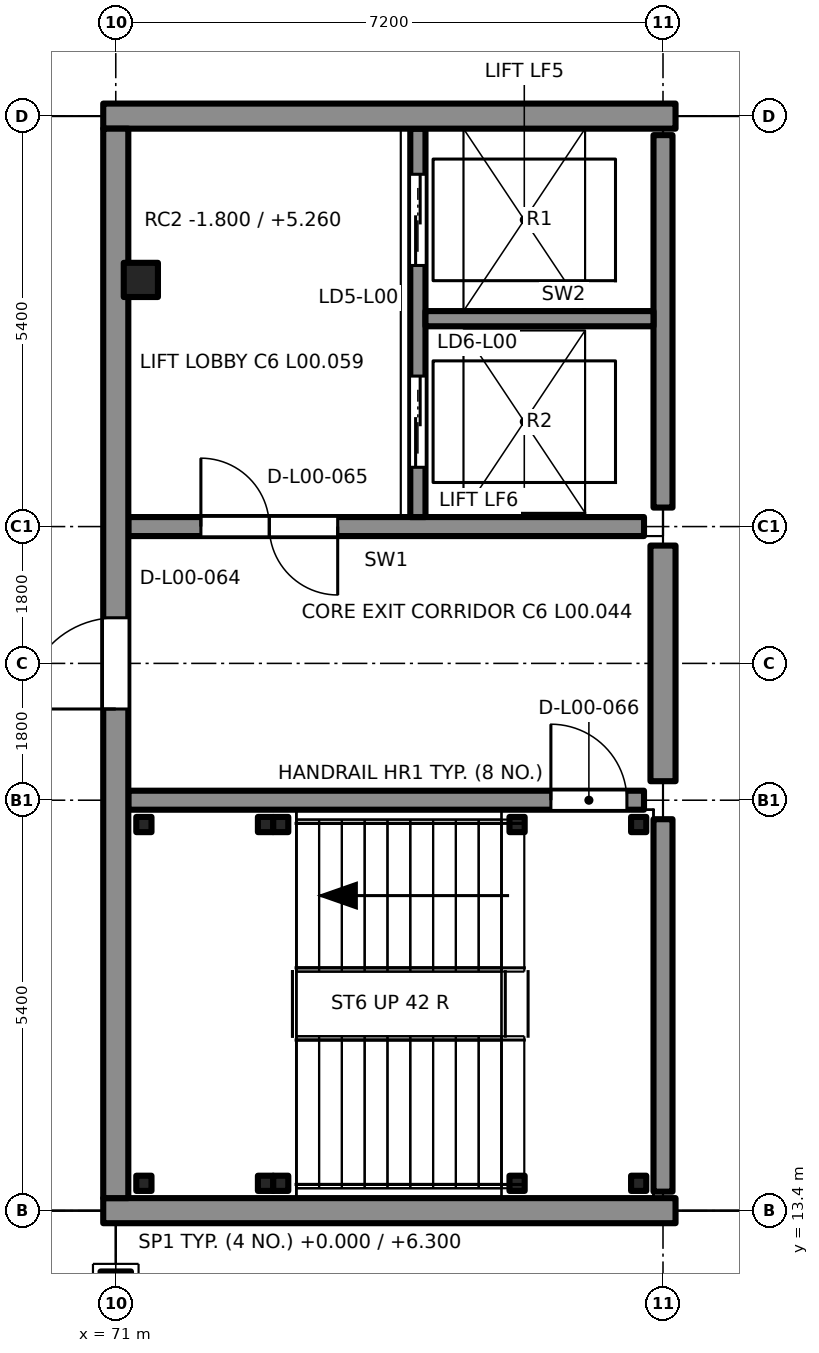
"""IFC4 building model, lengths in metres.
Left out: names, types, materials, properties, quantities, classifications, styles, units other than length and angle.
Written with IfcOpenShell. Run it as: python <this file> out.ifc"""

import sys

from ifc_helpers import new_model, si_unit, direction, frame, frame_2d, origin, origin_2d, place, context, subcontext, project, spatial, rectangle, extrude, element, fill, save


model = new_model("IFC4")
c1 = context("Model", 3, precision=1e-05, world=origin(), true_north=direction((0.0, 1.0)))
c2 = subcontext(c1, "Body", "Model", "MODEL_VIEW")
j1 = project(units=[si_unit("LENGTHUNIT", "METRE"), si_unit("PLANEANGLEUNIT", "RADIAN")], contexts=[c1])
p1 = place(None, origin())
s1 = spatial("IfcSite", under=j1, at=p1, CompositionType="ELEMENT")
p2 = place(p1, origin())
s2 = spatial("IfcBuilding", under=s1, at=p2, CompositionType="ELEMENT")
p3 = place(p2, origin())
s3 = spatial("IfcBuildingStorey", under=s2, at=p3, CompositionType="ELEMENT", Elevation=0.0)
for number, where, z_axis, x_axis in (
    (1, (84.4, 13.4, -0.2), (0.0, 0.0, 1.0), (1.0, 0.0, 0.0)),
    (2, (84.4, 27.8, -0.2), (0.0, 0.0, 1.0), (1.0, 0.0, 0.0)),
):
    element("IfcColumn", number, at=place(p3, frame(where, z_axis=z_axis, x_axis=x_axis)), inside=s3, PredefinedType="COLUMN", context=c2, shape_type="SweptSolid", body=[
        extrude(rectangle(XDim=1.6, YDim=1.2, at=origin_2d()), origin(), (-0.736, 0.0, 0.677), 6.794),
    ])
p4 = place(p3, frame((71.0, 12.4, -0.2), z_axis=(0.0, 0.0, 1.0), x_axis=(1.0, 0.0, 0.0)))
e3 = element("IfcColumn", 3, at=p4, inside=s3, PredefinedType="COLUMN", context=c2, shape_type="SweptSolid", body=[
    extrude(rectangle(XDim=0.4, YDim=0.4, at=origin_2d()), origin(), (0.0, 0.0, 1.0), 4.133),
])
p5 = place(p3, frame((71.33, 25.645, -1.8), z_axis=(0.0, 0.0, 1.0), x_axis=(1.0, 0.0, 0.0)))
e4 = element("IfcColumn", 4, at=p5, inside=s3, PredefinedType="COLUMN", context=c2, shape_type="SweptSolid", body=[
    extrude(rectangle(XDim=0.45, YDim=0.45, at=origin_2d()), origin(), (0.0, 0.0, 1.0), 7.06),
])
p6 = place(p3, frame((71.165, 18.8, 0.0), z_axis=(0.0, 0.0, 1.0), x_axis=(1.0, 0.0, 0.0)))
e5 = element("IfcWall", 5, at=p6, inside=s3, PredefinedType="SHEAR", context=c2, shape_type="SweptSolid", body=[
    extrude(rectangle(XDim=6.785, YDim=0.25, at=frame_2d((3.393, 0.0))), origin(), (0.0, 0.0, 1.0), 5.9),
])
p7 = place(p6, frame((5.56, 0.0, 0.0)))
e6 = element("IfcOpeningElement", 6, at=p7, cuts=e5, PredefinedType="OPENING", context=c2, shape_type="SweptSolid", body=[
    extrude(rectangle(XDim=1.0, YDim=2.1, at=frame_2d((0.5, 1.05))), frame((0.0, 0.135, 0.0), z_axis=(0.0, -1.0, 0.0), x_axis=(1.0, 0.0, 0.0)), (0.0, 0.0, 1.0), 0.27),
])
p8 = place(p3, frame((78.2, 13.65, 0.0), z_axis=(0.0, 0.0, 1.0), x_axis=(0.0, 1.0, 0.0)))
e7 = element("IfcWall", 7, at=p8, inside=s3, PredefinedType="SHEAR", context=c2, shape_type="SweptSolid", body=[
    extrude(rectangle(XDim=4.9, YDim=0.25, at=frame_2d((2.45, 0.0))), origin(), (0.0, 0.0, 1.0), 4.4),
])
p9 = place(p3, frame((71.165, 22.4, -1.4), z_axis=(0.0, 0.0, 1.0), x_axis=(1.0, 0.0, 0.0)))
e8 = element("IfcWall", 8, at=p9, inside=s3, PredefinedType="SHEAR", context=c2, shape_type="SweptSolid", body=[
    extrude(rectangle(XDim=6.785, YDim=0.25, at=frame_2d((3.393, 0.0))), origin(), (0.0, 0.0, 1.0), 7.3),
])
p10 = place(p9, frame((0.955, 0.0, 1.4)))
e9 = element("IfcOpeningElement", 9, at=p10, cuts=e8, PredefinedType="OPENING", context=c2, shape_type="SweptSolid", body=[
    extrude(rectangle(XDim=1.8, YDim=2.1, at=frame_2d((0.9, 1.05))), frame((0.0, 0.135, 0.0), z_axis=(0.0, -1.0, 0.0), x_axis=(1.0, 0.0, 0.0)), (0.0, 0.0, 1.0), 0.27),
])
p11 = place(p3, frame((78.2, 22.65, -1.4), z_axis=(0.0, 0.0, 1.0), x_axis=(0.0, 1.0, 0.0)))
e10 = element("IfcWall", 10, at=p11, inside=s3, PredefinedType="SHEAR", context=c2, shape_type="SweptSolid", body=[
    extrude(rectangle(XDim=4.9, YDim=0.25, at=frame_2d((2.45, 0.0))), origin(), (0.0, 0.0, 1.0), 5.8),
])
p12 = place(p3, frame((74.975, 22.525, -1.4), z_axis=(0.0, 0.0, 1.0), x_axis=(0.0, 1.0, 0.0)))
e11 = element("IfcWall", 11, at=p12, inside=s3, PredefinedType="SHEAR", context=c2, shape_type="SweptSolid", body=[
    extrude(rectangle(XDim=5.11, YDim=0.2, at=frame_2d((2.555, 0.0))), origin(), (0.0, 0.0, 1.0), 7.3),
])
p13 = place(p12, frame((3.31, 0.0, 1.4)))
e12 = element("IfcOpeningElement", 12, at=p13, cuts=e11, PredefinedType="OPENING", context=c2, shape_type="SweptSolid", body=[
    extrude(rectangle(XDim=1.2, YDim=2.1, at=frame_2d((0.6, 1.05))), frame((0.0, 0.11, 0.0), z_axis=(0.0, -1.0, 0.0), x_axis=(1.0, 0.0, 0.0)), (0.0, 0.0, 1.0), 0.22),
])
p14 = place(p12, frame((0.655, 0.0, 1.4)))
e13 = element("IfcOpeningElement", 13, at=p14, cuts=e11, PredefinedType="OPENING", context=c2, shape_type="SweptSolid", body=[
    extrude(rectangle(XDim=1.2, YDim=2.1, at=frame_2d((0.6, 1.05))), frame((0.0, 0.11, 0.0), z_axis=(0.0, -1.0, 0.0), x_axis=(1.0, 0.0, 0.0)), (0.0, 0.0, 1.0), 0.22),
])
p15 = place(p3, frame((78.075, 25.135, -1.4), z_axis=(0.0, 0.0, 1.0), x_axis=(-1.0, 0.0, 0.0)))
e14 = element("IfcWall", 14, at=p15, inside=s3, PredefinedType="SHEAR", context=c2, shape_type="SweptSolid", body=[
    extrude(rectangle(XDim=3.0, YDim=0.2, at=frame_2d((1.5, 0.0))), origin(), (0.0, 0.0, 1.0), 7.3),
])
p16 = place(p3, frame((74.875, 27.8, -1.4), z_axis=(0.0, 0.0, 1.0), x_axis=(1.0, 0.0, 0.0)))
e15 = element("IfcWall", 15, at=p16, inside=s3, PredefinedType="SHEAR", context=c2, shape_type="SweptSolid", body=[
    extrude(rectangle(XDim=3.2, YDim=0.25, at=frame_2d((1.6, 0.0))), origin(), (0.0, 0.0, 1.0), 1.4),
])
for number, where, z_axis, x_axis in (
    (16, (71.37, 13.76, 0.0), (0.0, 0.0, 1.0), (1.0, 0.0, 0.0)),
    (17, (71.37, 18.48, 0.0), (0.0, 0.0, 1.0), (1.0, 0.0, 0.0)),
):
    element("IfcColumn", number, at=place(p3, frame(where, z_axis=z_axis, x_axis=x_axis)), inside=s3, PredefinedType="COLUMN", context=c2, shape_type="SweptSolid", body=[
        extrude(rectangle(XDim=0.2, YDim=0.2, at=origin_2d()), origin(), (0.0, 0.0, 1.0), 6.3),
    ])
for number, where, z_axis, x_axis in (
    (18, (73.17, 13.76, 0.0), (0.0, 0.0, 1.0), (1.0, 0.0, 0.0)),
    (19, (73.17, 18.48, 0.0), (0.0, 0.0, 1.0), (1.0, 0.0, 0.0)),
):
    element("IfcColumn", number, at=place(p3, frame(where, z_axis=z_axis, x_axis=x_axis)), inside=s3, PredefinedType="COLUMN", context=c2, shape_type="SweptSolid", body=[
        extrude(rectangle(XDim=0.2, YDim=0.2, at=origin_2d()), origin(), (0.0, 0.0, 1.0), 4.45),
    ])
for number, where, z_axis, x_axis in (
    (20, (76.28, 13.76, 0.0), (0.0, 0.0, 1.0), (1.0, 0.0, 0.0)),
    (21, (76.28, 18.48, 0.0), (0.0, 0.0, 1.0), (1.0, 0.0, 0.0)),
    (22, (77.88, 13.76, 0.0), (0.0, 0.0, 1.0), (1.0, 0.0, 0.0)),
    (23, (77.88, 18.48, 0.0), (0.0, 0.0, 1.0), (1.0, 0.0, 0.0)),
):
    element("IfcColumn", number, at=place(p3, frame(where, z_axis=z_axis, x_axis=x_axis)), inside=s3, PredefinedType="COLUMN", context=c2, shape_type="SweptSolid", body=[
        extrude(rectangle(XDim=0.2, YDim=0.2, at=origin_2d()), origin(), (0.0, 0.0, 1.0), 2.95),
    ])
for number, where, z_axis, x_axis in (
    (24, (72.97, 13.76, 0.0), (0.0, 0.0, 1.0), (1.0, 0.0, 0.0)),
    (25, (72.97, 18.48, 0.0), (0.0, 0.0, 1.0), (1.0, 0.0, 0.0)),
):
    element("IfcColumn", number, at=place(p3, frame(where, z_axis=z_axis, x_axis=x_axis)), inside=s3, PredefinedType="COLUMN", context=c2, shape_type="SweptSolid", body=[
        extrude(rectangle(XDim=0.2, YDim=0.2, at=origin_2d()), origin(), (0.0, 0.0, 1.0), 6.3),
    ])
for number, where, z_axis, x_axis in (
    (26, (70.835, 13.4, 0.0), (0.0, 0.0, 1.0), (1.0, 0.0, 0.0)),
    (27, (70.835, 27.8, 0.0), (0.0, 0.0, 1.0), (1.0, 0.0, 0.0)),
):
    element("IfcWall", number, at=place(p3, frame(where, z_axis=z_axis, x_axis=x_axis)), inside=s3, PredefinedType="SOLIDWALL", context=c2, shape_type="SweptSolid", body=[
        extrude(rectangle(XDim=7.53, YDim=0.33, at=frame_2d((3.765, 0.0))), origin(), (0.0, 0.0, 1.0), 5.5),
    ])
p17 = place(p3, frame((71.0, 13.565, 0.0), z_axis=(0.0, 0.0, 1.0), x_axis=(0.0, 1.0, 0.0)))
e28 = element("IfcWall", 28, at=p17, inside=s3, PredefinedType="SOLIDWALL", context=c2, shape_type="SweptSolid", body=[
    extrude(rectangle(XDim=14.07, YDim=0.33, at=frame_2d((7.035, 0.0))), origin(), (0.0, 0.0, 1.0), 5.5),
])
p18 = place(p17, frame((6.435, 0.0, 0.0)))
e29 = element("IfcOpeningElement", 29, at=p18, cuts=e28, PredefinedType="OPENING", context=c2, shape_type="SweptSolid", body=[
    extrude(rectangle(XDim=1.2, YDim=2.1, at=frame_2d((0.6, 1.05))), frame((0.0, 0.175, 0.0), z_axis=(0.0, -1.0, 0.0), x_axis=(1.0, 0.0, 0.0)), (0.0, 0.0, 1.0), 0.35),
])
p19 = place(p3, frame((78.2, 19.05, 0.0), z_axis=(0.0, 0.0, 1.0), x_axis=(0.0, 1.0, 0.0)))
e30 = element("IfcWall", 30, at=p19, inside=s3, PredefinedType="SOLIDWALL", context=c2, shape_type="SweptSolid", body=[
    extrude(rectangle(XDim=3.1, YDim=0.33, at=frame_2d((1.55, 0.0))), origin(), (0.0, 0.0, 1.0), 5.5),
])
p20 = place(p7, origin())
e31 = element("IfcDoor", 31, at=p20, inside=s3, OperationType="SINGLE_SWING_RIGHT", PredefinedType="DOOR", context=c2, shape_type="SweptSolid", body=[
    extrude(rectangle(XDim=1.0, YDim=2.1, at=frame_2d((0.5, 1.05))), frame((0.0, 0.025, 0.0), z_axis=(0.0, -1.0, 0.0), x_axis=(1.0, 0.0, 0.0)), (0.0, 0.0, 1.0), 0.05),
])
fill(e6, e31)
p21 = place(p10, origin())
e32 = element("IfcDoor", 32, at=p21, inside=s3, OperationType="DOUBLE_DOOR_SINGLE_SWING", PredefinedType="DOOR", context=c2, shape_type="SweptSolid", body=[
    extrude(rectangle(XDim=1.8, YDim=2.1, at=frame_2d((0.9, 1.05))), frame((0.0, 0.025, 0.0), z_axis=(0.0, -1.0, 0.0), x_axis=(1.0, 0.0, 0.0)), (0.0, 0.0, 1.0), 0.05),
])
fill(e9, e32)
p22 = place(p13, origin())
e33 = element("IfcDoor", 33, at=p22, inside=s3, OperationType="DOUBLE_DOOR_SLIDING", PredefinedType="DOOR", context=c2, shape_type="SweptSolid", body=[
    extrude(rectangle(XDim=1.2, YDim=2.1, at=frame_2d((0.6, 1.05))), frame((0.0, 0.025, 0.0), z_axis=(0.0, -1.0, 0.0), x_axis=(1.0, 0.0, 0.0)), (0.0, 0.0, 1.0), 0.05),
])
fill(e12, e33)
p23 = place(p14, origin())
e34 = element("IfcDoor", 34, at=p23, inside=s3, OperationType="DOUBLE_DOOR_SLIDING", PredefinedType="DOOR", context=c2, shape_type="SweptSolid", body=[
    extrude(rectangle(XDim=1.2, YDim=2.1, at=frame_2d((0.6, 1.05))), frame((0.0, 0.025, 0.0), z_axis=(0.0, -1.0, 0.0), x_axis=(1.0, 0.0, 0.0)), (0.0, 0.0, 1.0), 0.05),
])
fill(e13, e34)
p24 = place(p18, origin())
e35 = element("IfcDoor", 35, at=p24, inside=s3, OperationType="SINGLE_SWING_LEFT", PredefinedType="DOOR", context=c2, shape_type="SweptSolid", body=[
    extrude(rectangle(XDim=1.2, YDim=2.1, at=frame_2d((0.6, 1.05))), frame((0.0, 0.025, 0.0), z_axis=(0.0, -1.0, 0.0), x_axis=(1.0, 0.0, 0.0)), (0.0, 0.0, 1.0), 0.05),
])
fill(e29, e35)
save(model, sys.argv[1])
